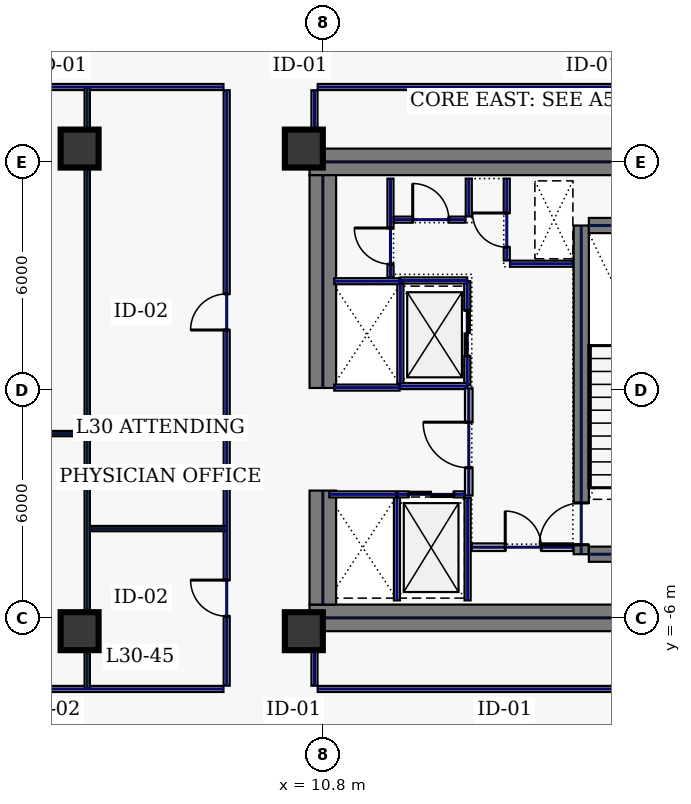
"""IFC4 building model, lengths in metres.
Left out: names, types, materials, properties, quantities, classifications, styles, units other than length and angle.
Written with IfcOpenShell. Run it as: python <this file> out.ifc"""

import sys

from ifc_helpers import new_model, si_unit, direction, frame, frame_2d, origin, origin_2d, place, context, subcontext, project, spatial, rectangle, hollow_rectangle, extrude, element, fill, save


model = new_model("IFC4")
c1 = context("Model", 3, precision=1e-05, world=origin(), true_north=direction((0.0, 1.0)))
c2 = subcontext(c1, "Body", "Model", "MODEL_VIEW")
j1 = project(units=[si_unit("LENGTHUNIT", "METRE"), si_unit("PLANEANGLEUNIT", "RADIAN")], contexts=[c1])
p1 = place(None, origin())
s1 = spatial("IfcSite", under=j1, at=p1, CompositionType="ELEMENT")
p2 = place(p1, origin())
s2 = spatial("IfcBuilding", under=s1, at=p2, CompositionType="ELEMENT")
p3 = place(p2, frame((0.0, 0.0, 133.4)))
s3 = spatial("IfcBuildingStorey", under=s2, at=p3, CompositionType="ELEMENT", Elevation=133.4)
for number, where, z_axis, x_axis in (
    (1, (10.45, 6.0, 0.0), (0.0, 0.0, 1.0), (1.0, 0.0, 0.0)),
    (2, (10.45, -6.0, 0.0), (0.0, 0.0, 1.0), (1.0, 0.0, 0.0)),
):
    element("IfcWall", number, at=place(p3, frame(where, z_axis=z_axis, x_axis=x_axis)), inside=s3, PredefinedType="SHEAR", context=c2, shape_type="SweptSolid", body=[
        extrude(rectangle(XDim=11.55, YDim=0.7, at=frame_2d((5.775, 0.0))), origin(), (0.0, 0.0, 1.0), 3.74),
    ])
p4 = place(p3, frame((10.8, -5.65, 0.0), z_axis=(0.0, 0.0, 1.0), x_axis=(0.0, 1.0, 0.0)))
e3 = element("IfcWall", 3, at=p4, inside=s3, PredefinedType="SHEAR", context=c2, shape_type="SweptSolid", body=[
    extrude(rectangle(XDim=3.0, YDim=0.7, at=frame_2d((1.5, 0.0))), origin(), (0.0, 0.0, 1.0), 3.74),
])
p5 = place(p3, frame((10.8, 0.05, 0.0), z_axis=(0.0, 0.0, 1.0), x_axis=(0.0, 1.0, 0.0)))
e4 = element("IfcWall", 4, at=p5, inside=s3, PredefinedType="SHEAR", context=c2, shape_type="SweptSolid", body=[
    extrude(rectangle(XDim=5.6, YDim=0.7, at=frame_2d((2.8, 0.0))), origin(), (0.0, 0.0, 1.0), 3.74),
])
p6 = place(p3, frame((17.6, -4.325, 0.0), z_axis=(0.0, 0.0, 1.0), x_axis=(0.0, 1.0, 0.0)))
e5 = element("IfcWall", 5, at=p6, inside=s3, PredefinedType="SHEAR", context=c2, shape_type="SweptSolid", body=[
    extrude(rectangle(XDim=8.65, YDim=0.4, at=frame_2d((4.325, 0.0))), origin(), (0.0, 0.0, 1.0), 3.74),
])
p7 = place(p6, frame((0.25, 0.0, 0.0)))
e6 = element("IfcOpeningElement", 6, at=p7, cuts=e5, PredefinedType="OPENING", context=c2, shape_type="SweptSolid", body=[
    extrude(rectangle(XDim=1.1, YDim=2.2, at=frame_2d((0.55, 1.1))), frame((0.0, 0.21, 0.0), z_axis=(0.0, -1.0, 0.0), x_axis=(1.0, 0.0, 0.0)), (0.0, 0.0, 1.0), 0.42),
])
for number, where, z_axis, x_axis in (
    (7, (17.8, -4.325, 0.0), (0.0, 0.0, 1.0), (1.0, 0.0, 0.0)),
    (8, (17.8, 4.325, 0.0), (0.0, 0.0, 1.0), (1.0, 0.0, 0.0)),
):
    element("IfcWall", number, at=place(p3, frame(where, z_axis=z_axis, x_axis=x_axis)), inside=s3, PredefinedType="SHEAR", context=c2, shape_type="SweptSolid", body=[
        extrude(rectangle(XDim=3.4, YDim=0.4, at=frame_2d((1.7, 0.0))), origin(), (0.0, 0.0, 1.0), 3.74),
    ])
for number, where, z_axis, x_axis in (
    (9, (10.3, -6.35, 0.0), (0.0, 0.0, 1.0), (1.0, 0.0, 0.0)),
    (10, (10.3, 6.35, 0.0), (0.0, 0.0, 1.0), (1.0, 0.0, 0.0)),
    (11, (4.4, -6.35, 0.0), (0.0, 0.0, 1.0), (1.0, 0.0, 0.0)),
    (12, (4.4, 6.35, 0.0), (0.0, 0.0, 1.0), (1.0, 0.0, 0.0)),
):
    element("IfcColumn", number, at=place(p3, frame(where, z_axis=z_axis, x_axis=x_axis)), inside=s3, PredefinedType="COLUMN", context=c2, shape_type="SweptSolid", body=[
        extrude(hollow_rectangle(XDim=1.0, YDim=1.0, WallThickness=0.045, at=origin_2d()), origin(), (0.0, 0.0, 1.0), 3.74),
    ])
p8 = place(p3, frame((14.6, 0.12, 0.0), z_axis=(0.0, 0.0, 1.0), x_axis=(0.0, 1.0, 0.0)))
e13 = element("IfcWall", 13, at=p8, inside=s3, PredefinedType="PARTITIONING", context=c2, shape_type="SweptSolid", body=[
    extrude(rectangle(XDim=2.74, YDim=0.16, at=frame_2d((1.37, 0.0))), origin(), (0.0, 0.0, 1.0), 3.74),
])
p9 = place(p8, frame((0.77, 0.0, 0.0)))
e14 = element("IfcOpeningElement", 14, at=p9, cuts=e13, PredefinedType="OPENING", context=c2, shape_type="SweptSolid", body=[
    extrude(rectangle(XDim=1.2, YDim=2.2, at=frame_2d((0.6, 1.1))), frame((0.0, 0.09, 0.0), z_axis=(0.0, -1.0, 0.0), x_axis=(1.0, 0.0, 0.0)), (0.0, 0.0, 1.0), 0.18),
])
for number, where, z_axis, x_axis in (
    (15, (12.84, 0.1, 0.0), (0.0, 0.0, 1.0), (1.0, 0.0, 0.0)),
    (16, (12.84, 2.88, 0.0), (0.0, 0.0, 1.0), (1.0, 0.0, 0.0)),
):
    element("IfcWall", number, at=place(p3, frame(where, z_axis=z_axis, x_axis=x_axis)), inside=s3, PredefinedType="PARTITIONING", context=c2, shape_type="SweptSolid", body=[
        extrude(rectangle(XDim=1.76, YDim=0.16, at=frame_2d((0.88, 0.0))), origin(), (0.0, 0.0, 1.0), 3.74),
    ])
p10 = place(p3, frame((12.84, 0.18, 0.0), z_axis=(0.0, 0.0, 1.0), x_axis=(0.0, 1.0, 0.0)))
e17 = element("IfcWall", 17, at=p10, inside=s3, PredefinedType="PARTITIONING", context=c2, shape_type="SweptSolid", body=[
    extrude(rectangle(XDim=2.62, YDim=0.16, at=frame_2d((1.31, 0.0))), origin(), (0.0, 0.0, 1.0), 3.74),
])
p11 = place(p3, frame((12.77, -2.75, 0.0), z_axis=(0.0, 0.0, 1.0), x_axis=(1.0, 0.0, 0.0)))
e18 = element("IfcWall", 18, at=p11, inside=s3, PredefinedType="PARTITIONING", context=c2, shape_type="SweptSolid", body=[
    extrude(rectangle(XDim=1.76, YDim=0.16, at=frame_2d((0.88, 0.0))), origin(), (0.0, 0.0, 1.0), 3.74),
])
p12 = place(p11, frame((0.28, 0.0, 0.0)))
e19 = element("IfcOpeningElement", 19, at=p12, cuts=e18, PredefinedType="OPENING", context=c2, shape_type="SweptSolid", body=[
    extrude(rectangle(XDim=1.2, YDim=2.2, at=frame_2d((0.6, 1.1))), frame((0.0, 0.09, 0.0), z_axis=(0.0, -1.0, 0.0), x_axis=(1.0, 0.0, 0.0)), (0.0, 0.0, 1.0), 0.18),
])
for number, where, z_axis, x_axis in (
    (20, (12.75, -5.54, 0.0), (0.0, 0.0, 1.0), (0.0, 1.0, 0.0)),
    (21, (14.61, -5.54, 0.0), (0.0, 0.0, 1.0), (0.0, 1.0, 0.0)),
):
    element("IfcWall", number, at=place(p3, frame(where, z_axis=z_axis, x_axis=x_axis)), inside=s3, PredefinedType="PARTITIONING", context=c2, shape_type="SweptSolid", body=[
        extrude(rectangle(XDim=2.7, YDim=0.16, at=frame_2d((1.35, 0.0))), origin(), (0.0, 0.0, 1.0), 3.74),
    ])
p13 = place(p3, frame((10.97, -2.75, 0.0), z_axis=(0.0, 0.0, 1.0), x_axis=(1.0, 0.0, 0.0)))
e22 = element("IfcWall", 22, at=p13, inside=s3, PredefinedType="PARTITIONING", context=c2, shape_type="SweptSolid", body=[
    extrude(rectangle(XDim=1.76, YDim=0.16, at=frame_2d((0.88, 0.0))), origin(), (0.0, 0.0, 1.0), 3.74),
])
for number, where, z_axis, x_axis in (
    (23, (11.1, 0.06, 0.0), (0.0, 0.0, 1.0), (1.0, 0.0, 0.0)),
    (24, (11.1, 2.86, 0.0), (0.0, 0.0, 1.0), (1.0, 0.0, 0.0)),
):
    element("IfcWall", number, at=place(p3, frame(where, z_axis=z_axis, x_axis=x_axis)), inside=s3, PredefinedType="PARTITIONING", context=c2, shape_type="SweptSolid", body=[
        extrude(rectangle(XDim=1.72, YDim=0.16, at=frame_2d((0.86, 0.0))), origin(), (0.0, 0.0, 1.0), 3.74),
    ])
p14 = place(p3, frame((15.64, 3.405, 0.0), z_axis=(0.0, 0.0, 1.0), x_axis=(0.0, 1.0, 0.0)))
e25 = element("IfcWall", 25, at=p14, inside=s3, PredefinedType="PARTITIONING", context=c2, shape_type="SweptSolid", body=[
    extrude(rectangle(XDim=2.155, YDim=0.16, at=frame_2d((1.078, 0.0))), origin(), (0.0, 0.0, 1.0), 3.74),
])
p15 = place(p14, frame((0.35, 0.0, 0.0)))
e26 = element("IfcOpeningElement", 26, at=p15, cuts=e25, PredefinedType="OPENING", context=c2, shape_type="SweptSolid", body=[
    extrude(rectangle(XDim=0.9, YDim=2.2, at=frame_2d((0.45, 1.1))), frame((0.0, 0.09, 0.0), z_axis=(0.0, -1.0, 0.0), x_axis=(1.0, 0.0, 0.0)), (0.0, 0.0, 1.0), 0.18),
])
p16 = place(p3, frame((15.725, 3.32, 0.0), z_axis=(0.0, 0.0, 1.0), x_axis=(1.0, 0.0, 0.0)))
e27 = element("IfcWall", 27, at=p16, inside=s3, PredefinedType="PARTITIONING", context=c2, shape_type="SweptSolid", body=[
    extrude(rectangle(XDim=1.655, YDim=0.16, at=frame_2d((0.827, 0.0))), origin(), (0.0, 0.0, 1.0), 3.74),
])
p17 = place(p3, frame((14.72, -4.14, 0.0), z_axis=(0.0, 0.0, 1.0), x_axis=(1.0, 0.0, 0.0)))
e28 = element("IfcWall", 28, at=p17, inside=s3, PredefinedType="SOLIDWALL", context=c2, shape_type="SweptSolid", body=[
    extrude(rectangle(XDim=2.66, YDim=0.2, at=frame_2d((1.33, 0.0))), origin(), (0.0, 0.0, 1.0), 3.74),
])
p18 = place(p17, frame((0.88, 0.0, 0.0)))
e29 = element("IfcOpeningElement", 29, at=p18, cuts=e28, PredefinedType="OPENING", context=c2, shape_type="SweptSolid", body=[
    extrude(rectangle(XDim=0.95, YDim=2.2, at=frame_2d((0.475, 1.1))), frame((0.0, 0.11, 0.0), z_axis=(0.0, -1.0, 0.0), x_axis=(1.0, 0.0, 0.0)), (0.0, 0.0, 1.0), 0.22),
])
p19 = place(p3, frame((12.58, 2.96, 0.0), z_axis=(0.0, 0.0, 1.0), x_axis=(0.0, 1.0, 0.0)))
e30 = element("IfcWall", 30, at=p19, inside=s3, PredefinedType="PARTITIONING", context=c2, shape_type="SweptSolid", body=[
    extrude(rectangle(XDim=2.6, YDim=0.16, at=frame_2d((1.3, 0.0))), origin(), (0.0, 0.0, 1.0), 3.74),
])
p20 = place(p19, frame((0.35, 0.0, 0.0)))
e31 = element("IfcOpeningElement", 31, at=p20, cuts=e30, PredefinedType="OPENING", context=c2, shape_type="SweptSolid", body=[
    extrude(rectangle(XDim=0.95, YDim=2.2, at=frame_2d((0.475, 1.1))), frame((0.0, 0.09, 0.0), z_axis=(0.0, -1.0, 0.0), x_axis=(1.0, 0.0, 0.0)), (0.0, 0.0, 1.0), 0.18),
])
p21 = place(p3, frame((12.665, 4.48, 0.0), z_axis=(0.0, 0.0, 1.0), x_axis=(1.0, 0.0, 0.0)))
e32 = element("IfcWall", 32, at=p21, inside=s3, PredefinedType="PARTITIONING", context=c2, shape_type="SweptSolid", body=[
    extrude(rectangle(XDim=1.89, YDim=0.16, at=frame_2d((0.945, 0.0))), origin(), (0.0, 0.0, 1.0), 3.74),
])
p22 = place(p21, frame((0.5, 0.0, 0.0)))
e33 = element("IfcOpeningElement", 33, at=p22, cuts=e32, PredefinedType="OPENING", context=c2, shape_type="SweptSolid", body=[
    extrude(rectangle(XDim=0.95, YDim=2.2, at=frame_2d((0.475, 1.1))), frame((0.0, 0.09, 0.0), z_axis=(0.0, -1.0, 0.0), x_axis=(1.0, 0.0, 0.0)), (0.0, 0.0, 1.0), 0.18),
])
p23 = place(p3, frame((14.64, 4.565, 0.0), z_axis=(0.0, 0.0, 1.0), x_axis=(0.0, 1.0, 0.0)))
e34 = element("IfcWall", 34, at=p23, inside=s3, PredefinedType="PARTITIONING", context=c2, shape_type="SweptSolid", body=[
    extrude(rectangle(XDim=0.995, YDim=0.16, at=frame_2d((0.498, 0.0))), origin(), (0.0, 0.0, 1.0), 3.74),
])
p24 = place(p3, frame((14.64, -2.78, 0.0), z_axis=(0.0, 0.0, 1.0), x_axis=(0.0, 1.0, 0.0)))
e35 = element("IfcWall", 35, at=p24, inside=s3, PredefinedType="SOLIDWALL", context=c2, shape_type="SweptSolid", body=[
    extrude(rectangle(XDim=2.82, YDim=0.2, at=frame_2d((1.41, 0.0))), origin(), (0.0, 0.0, 1.0), 3.74),
])
p25 = place(p24, frame((0.73, 0.0, 0.0)))
e36 = element("IfcOpeningElement", 36, at=p25, cuts=e35, PredefinedType="OPENING", context=c2, shape_type="SweptSolid", body=[
    extrude(rectangle(XDim=1.2, YDim=2.2, at=frame_2d((0.6, 1.1))), frame((0.0, 0.11, 0.0), z_axis=(0.0, -1.0, 0.0), x_axis=(1.0, 0.0, 0.0)), (0.0, 0.0, 1.0), 0.22),
])
p26 = place(p3, frame((25.235, 7.97, 0.0), z_axis=(0.0, 0.0, 1.0), x_axis=(-1.0, 0.0, 0.0)))
e37 = element("IfcWall", 37, at=p26, inside=s3, PredefinedType="PARTITIONING", context=c2, shape_type="SweptSolid", body=[
    extrude(rectangle(XDim=14.57, YDim=0.16, at=frame_2d((7.285, 0.0))), origin(), (0.0, 0.0, 1.0), 3.74),
])
p27 = place(p3, frame((10.58, 7.885, 0.0), z_axis=(0.0, 0.0, 1.0), x_axis=(0.0, -1.0, 0.0)))
e38 = element("IfcWall", 38, at=p27, inside=s3, PredefinedType="PARTITIONING", context=c2, shape_type="SweptSolid", body=[
    extrude(rectangle(XDim=1.465, YDim=0.16, at=frame_2d((0.732, 0.0))), origin(), (0.0, 0.0, 1.0), 3.74),
])
p28 = place(p3, frame((10.58, -6.42, 0.0), z_axis=(0.0, 0.0, 1.0), x_axis=(0.0, -1.0, 0.0)))
e39 = element("IfcWall", 39, at=p28, inside=s3, PredefinedType="PARTITIONING", context=c2, shape_type="SweptSolid", body=[
    extrude(rectangle(XDim=1.365, YDim=0.16, at=frame_2d((0.683, 0.0))), origin(), (0.0, 0.0, 1.0), 3.74),
])
p29 = place(p3, frame((10.665, -7.87, 0.0), z_axis=(0.0, 0.0, 1.0), x_axis=(1.0, 0.0, 0.0)))
e40 = element("IfcWall", 40, at=p29, inside=s3, PredefinedType="PARTITIONING", context=c2, shape_type="SweptSolid", body=[
    extrude(rectangle(XDim=14.57, YDim=0.16, at=frame_2d((7.285, 0.0))), origin(), (0.0, 0.0, 1.0), 3.74),
])
p30 = place(p3, frame((8.27, -7.785, 0.0), z_axis=(0.0, 0.0, 1.0), x_axis=(0.0, 1.0, 0.0)))
e41 = element("IfcWall", 41, at=p30, inside=s3, PredefinedType="PARTITIONING", context=c2, shape_type="SweptSolid", body=[
    extrude(rectangle(XDim=15.67, YDim=0.16, at=frame_2d((7.835, 0.0))), origin(), (0.0, 0.0, 1.0), 3.74),
])
p31 = place(p30, frame((1.829, 0.0, 0.0)))
e42 = element("IfcOpeningElement", 42, at=p31, cuts=e41, PredefinedType="OPENING", context=c2, shape_type="SweptSolid", body=[
    extrude(rectangle(XDim=0.95, YDim=2.2, at=frame_2d((0.475, 1.1))), frame((0.0, 0.09, 0.0), z_axis=(0.0, -1.0, 0.0), x_axis=(1.0, 0.0, 0.0)), (0.0, 0.0, 1.0), 0.18),
])
p32 = place(p30, frame((9.361, 0.0, 0.0)))
e43 = element("IfcOpeningElement", 43, at=p32, cuts=e41, PredefinedType="OPENING", context=c2, shape_type="SweptSolid", body=[
    extrude(rectangle(XDim=0.95, YDim=2.2, at=frame_2d((0.475, 1.1))), frame((0.0, 0.09, 0.0), z_axis=(0.0, -1.0, 0.0), x_axis=(1.0, 0.0, 0.0)), (0.0, 0.0, 1.0), 0.18),
])
p33 = place(p3, frame((8.185, 7.97, 0.0), z_axis=(0.0, 0.0, 1.0), x_axis=(-1.0, 0.0, 0.0)))
e44 = element("IfcWall", 44, at=p33, inside=s3, PredefinedType="PARTITIONING", context=c2, shape_type="SweptSolid", body=[
    extrude(rectangle(XDim=16.37, YDim=0.16, at=frame_2d((8.185, 0.0))), origin(), (0.0, 0.0, 1.0), 3.74),
])
p34 = place(p33, frame((7.795, 0.0, 0.0)))
e45 = element("IfcOpeningElement", 45, at=p34, cuts=e44, PredefinedType="OPENING", context=c2, shape_type="SweptSolid", body=[
    extrude(rectangle(XDim=0.95, YDim=2.2, at=frame_2d((0.475, 1.1))), frame((0.0, 0.09, 0.0), z_axis=(0.0, -1.0, 0.0), x_axis=(1.0, 0.0, 0.0)), (0.0, 0.0, 1.0), 0.18),
])
p35 = place(p3, frame((-8.185, -7.87, 0.0), z_axis=(0.0, 0.0, 1.0), x_axis=(1.0, 0.0, 0.0)))
e46 = element("IfcWall", 46, at=p35, inside=s3, PredefinedType="PARTITIONING", context=c2, shape_type="SweptSolid", body=[
    extrude(rectangle(XDim=16.37, YDim=0.16, at=frame_2d((8.185, 0.0))), origin(), (0.0, 0.0, 1.0), 3.74),
])
p36 = place(p35, frame((1.554, 0.0, 0.0)))
e47 = element("IfcOpeningElement", 47, at=p36, cuts=e46, PredefinedType="OPENING", context=c2, shape_type="SweptSolid", body=[
    extrude(rectangle(XDim=0.95, YDim=2.2, at=frame_2d((0.475, 1.1))), frame((0.0, 0.09, 0.0), z_axis=(0.0, -1.0, 0.0), x_axis=(1.0, 0.0, 0.0)), (0.0, 0.0, 1.0), 0.18),
])
p37 = place(p35, frame((7.795, 0.0, 0.0)))
e48 = element("IfcOpeningElement", 48, at=p37, cuts=e46, PredefinedType="OPENING", context=c2, shape_type="SweptSolid", body=[
    extrude(rectangle(XDim=0.95, YDim=2.2, at=frame_2d((0.475, 1.1))), frame((0.0, 0.09, 0.0), z_axis=(0.0, -1.0, 0.0), x_axis=(1.0, 0.0, 0.0)), (0.0, 0.0, 1.0), 0.18),
])
p38 = place(p3, frame((4.6, -7.865, 0.0), z_axis=(0.0, 0.0, 1.0), x_axis=(0.0, 1.0, 0.0)))
e49 = element("IfcWall", 49, at=p38, inside=s3, PredefinedType="PARTITIONING", context=c2, shape_type="SweptSolid", body=[
    extrude(rectangle(XDim=15.83, YDim=0.14, at=frame_2d((7.915, 0.0))), origin(), (0.0, 0.0, 1.0), 2.935),
])
p39 = place(p3, frame((-4.525, -1.15, 0.0), z_axis=(0.0, 0.0, 1.0), x_axis=(1.0, 0.0, 0.0)))
e50 = element("IfcWall", 50, at=p39, inside=s3, PredefinedType="PARTITIONING", context=c2, shape_type="SweptSolid", body=[
    extrude(rectangle(XDim=9.05, YDim=0.14, at=frame_2d((4.525, 0.0))), origin(), (0.0, 0.0, 1.0), 3.74),
])
p40 = place(p3, frame((4.675, -3.65, 0.0), z_axis=(0.0, 0.0, 1.0), x_axis=(1.0, 0.0, 0.0)))
e51 = element("IfcWall", 51, at=p40, inside=s3, PredefinedType="PARTITIONING", context=c2, shape_type="SweptSolid", body=[
    extrude(rectangle(XDim=3.59, YDim=0.14, at=frame_2d((1.795, 0.0))), origin(), (0.0, 0.0, 1.0), 3.74),
])
p41 = place(p7, origin())
e52 = element("IfcDoor", 52, at=p41, inside=s3, OperationType="SINGLE_SWING_LEFT", PredefinedType="DOOR", context=c2, shape_type="SweptSolid", body=[
    extrude(rectangle(XDim=1.1, YDim=2.2, at=frame_2d((0.55, 1.1))), frame((0.0, 0.025, 0.0), z_axis=(0.0, -1.0, 0.0), x_axis=(1.0, 0.0, 0.0)), (0.0, 0.0, 1.0), 0.05),
])
fill(e6, e52)
p42 = place(p9, origin())
e53 = element("IfcDoor", 53, at=p42, inside=s3, OperationType="SLIDING_TO_LEFT", PredefinedType="DOOR", context=c2, shape_type="SweptSolid", body=[
    extrude(rectangle(XDim=1.2, YDim=2.2, at=frame_2d((0.6, 1.1))), frame((0.0, 0.025, 0.0), z_axis=(0.0, -1.0, 0.0), x_axis=(1.0, 0.0, 0.0)), (0.0, 0.0, 1.0), 0.05),
])
fill(e14, e53)
p43 = place(p12, origin())
e54 = element("IfcDoor", 54, at=p43, inside=s3, OperationType="SLIDING_TO_LEFT", PredefinedType="DOOR", context=c2, shape_type="SweptSolid", body=[
    extrude(rectangle(XDim=1.2, YDim=2.2, at=frame_2d((0.6, 1.1))), frame((0.0, 0.025, 0.0), z_axis=(0.0, -1.0, 0.0), x_axis=(1.0, 0.0, 0.0)), (0.0, 0.0, 1.0), 0.05),
])
fill(e19, e54)
p44 = place(p15, origin())
e55 = element("IfcDoor", 55, at=p44, inside=s3, OperationType="SINGLE_SWING_RIGHT", PredefinedType="DOOR", context=c2, shape_type="SweptSolid", body=[
    extrude(rectangle(XDim=0.9, YDim=2.2, at=frame_2d((0.45, 1.1))), frame((0.0, 0.025, 0.0), z_axis=(0.0, -1.0, 0.0), x_axis=(1.0, 0.0, 0.0)), (0.0, 0.0, 1.0), 0.05),
])
fill(e26, e55)
p45 = place(p18, origin())
e56 = element("IfcDoor", 56, at=p45, inside=s3, OperationType="SINGLE_SWING_LEFT", PredefinedType="DOOR", context=c2, shape_type="SweptSolid", body=[
    extrude(rectangle(XDim=0.95, YDim=2.2, at=frame_2d((0.475, 1.1))), frame((0.0, 0.025, 0.0), z_axis=(0.0, -1.0, 0.0), x_axis=(1.0, 0.0, 0.0)), (0.0, 0.0, 1.0), 0.05),
])
fill(e29, e56)
p46 = place(p20, origin())
e57 = element("IfcDoor", 57, at=p46, inside=s3, OperationType="SINGLE_SWING_RIGHT", PredefinedType="DOOR", context=c2, shape_type="SweptSolid", body=[
    extrude(rectangle(XDim=0.95, YDim=2.2, at=frame_2d((0.475, 1.1))), frame((0.0, 0.025, 0.0), z_axis=(0.0, -1.0, 0.0), x_axis=(1.0, 0.0, 0.0)), (0.0, 0.0, 1.0), 0.05),
])
fill(e31, e57)
p47 = place(p22, origin())
e58 = element("IfcDoor", 58, at=p47, inside=s3, OperationType="SINGLE_SWING_LEFT", PredefinedType="DOOR", context=c2, shape_type="SweptSolid", body=[
    extrude(rectangle(XDim=0.95, YDim=2.2, at=frame_2d((0.475, 1.1))), frame((0.0, 0.025, 0.0), z_axis=(0.0, -1.0, 0.0), x_axis=(1.0, 0.0, 0.0)), (0.0, 0.0, 1.0), 0.05),
])
fill(e33, e58)
p48 = place(p25, origin())
e59 = element("IfcDoor", 59, at=p48, inside=s3, OperationType="SINGLE_SWING_RIGHT", PredefinedType="DOOR", context=c2, shape_type="SweptSolid", body=[
    extrude(rectangle(XDim=1.2, YDim=2.2, at=frame_2d((0.6, 1.1))), frame((0.0, 0.025, 0.0), z_axis=(0.0, -1.0, 0.0), x_axis=(1.0, 0.0, 0.0)), (0.0, 0.0, 1.0), 0.05),
])
fill(e36, e59)
p49 = place(p31, origin())
e60 = element("IfcDoor", 60, at=p49, inside=s3, OperationType="SINGLE_SWING_RIGHT", PredefinedType="DOOR", context=c2, shape_type="SweptSolid", body=[
    extrude(rectangle(XDim=0.95, YDim=2.2, at=frame_2d((0.475, 1.1))), frame((0.0, 0.025, 0.0), z_axis=(0.0, -1.0, 0.0), x_axis=(1.0, 0.0, 0.0)), (0.0, 0.0, 1.0), 0.05),
])
fill(e42, e60)
p50 = place(p32, origin())
e61 = element("IfcDoor", 61, at=p50, inside=s3, OperationType="SINGLE_SWING_LEFT", PredefinedType="DOOR", context=c2, shape_type="SweptSolid", body=[
    extrude(rectangle(XDim=0.95, YDim=2.2, at=frame_2d((0.475, 1.1))), frame((0.0, 0.025, 0.0), z_axis=(0.0, -1.0, 0.0), x_axis=(1.0, 0.0, 0.0)), (0.0, 0.0, 1.0), 0.05),
])
fill(e43, e61)
save(model, sys.argv[1])
